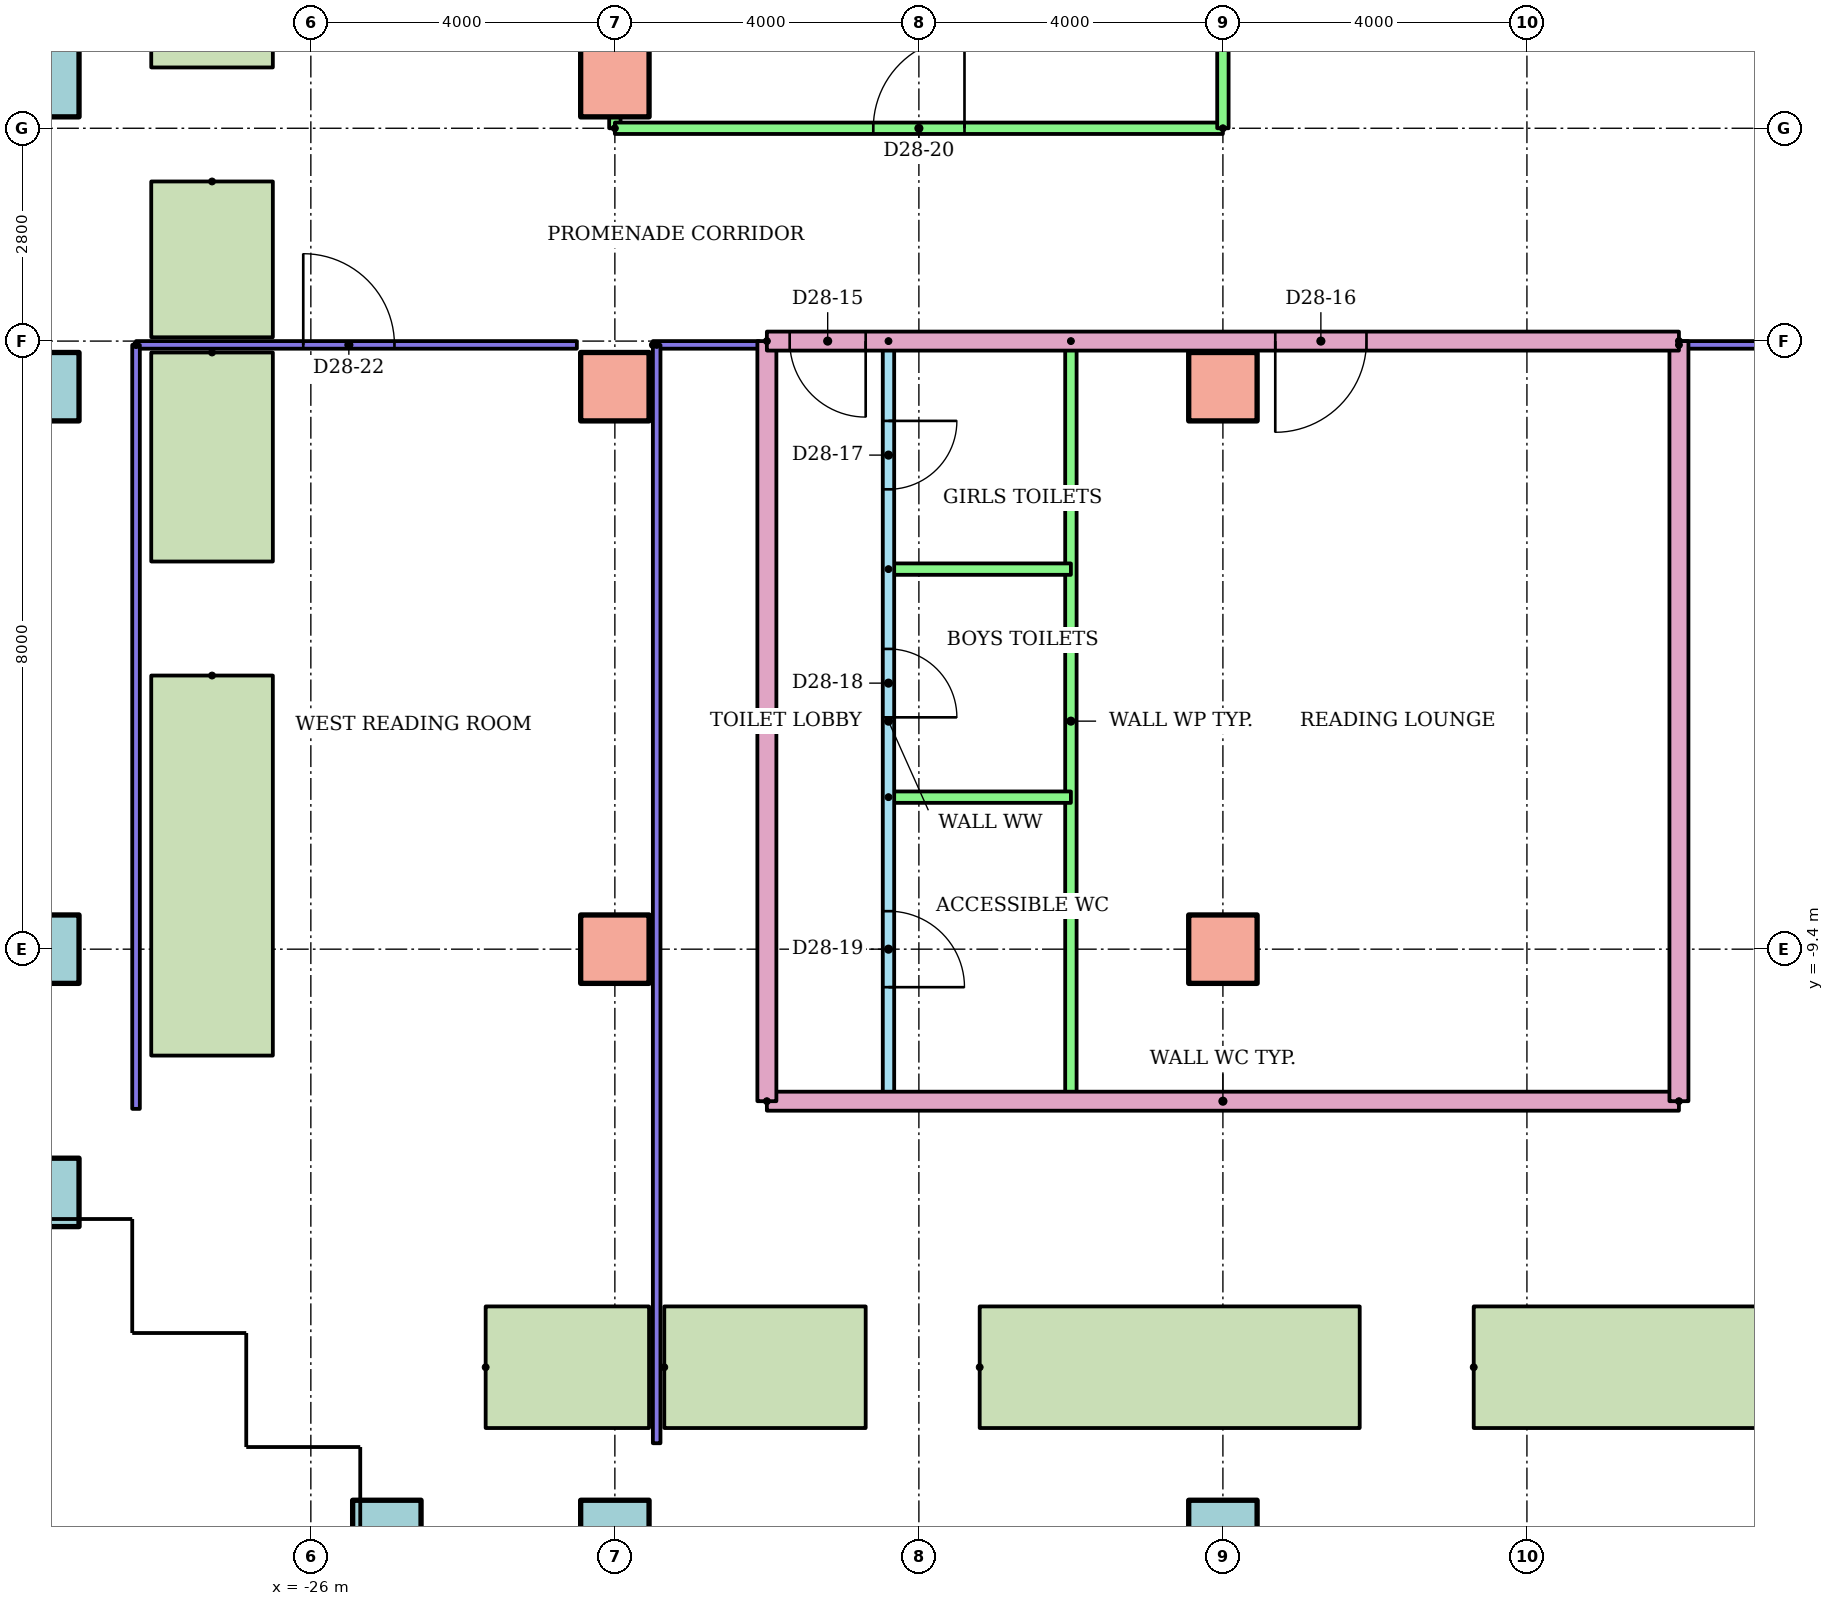
"""IFC4 building model, lengths in metres.
Left out: names, types, materials, properties, quantities, classifications, styles, units other than length and angle.
Written with IfcOpenShell. Run it as: python <this file> out.ifc"""

import sys

from ifc_helpers import new_model, si_unit, direction, frame, frame_2d, origin, origin_2d, place, context, subcontext, project, spatial, rectangle, hollow_rectangle, extrude, element, fill, save


model = new_model("IFC4")
c1 = context("Model", 3, precision=1e-05, world=origin(), true_north=direction((0.0, 1.0)))
c2 = subcontext(c1, "Body", "Model", "MODEL_VIEW")
j1 = project(units=[si_unit("LENGTHUNIT", "METRE"), si_unit("PLANEANGLEUNIT", "RADIAN")], contexts=[c1])
p1 = place(None, origin())
s1 = spatial("IfcSite", under=j1, at=p1, CompositionType="ELEMENT")
p2 = place(p1, origin())
s2 = spatial("IfcBuilding", under=s1, at=p2, CompositionType="ELEMENT")
p3 = place(p2, frame((0.0, 0.0, 106.3)))
s3 = spatial("IfcBuildingStorey", under=s2, at=p3, CompositionType="ELEMENT", Elevation=106.3)
p4 = place(p3, frame((-25.0, -17.1, 0.0)))
e1 = element("IfcColumn", 1, at=p4, inside=s3, PredefinedType="COLUMN", context=c2, shape_type="SweptSolid", body=[
    extrude(hollow_rectangle(XDim=0.9, YDim=0.9, WallThickness=0.045, at=origin_2d()), origin(), (0.0, 0.0, 1.0), 8.8),
])
for number, where in (
    (2, (-22.0, -17.1, 0.0)),
    (3, (-14.0, -17.1, 0.0)),
):
    element("IfcColumn", number, at=place(p3, frame(where)), inside=s3, PredefinedType="COLUMN", context=c2, shape_type="SweptSolid", body=[
        extrude(hollow_rectangle(XDim=0.9, YDim=0.9, WallThickness=0.045, at=origin_2d()), origin(), (0.0, 0.0, 1.0), 9.6),
    ])
for number, where in (
    (4, (-29.5, -12.6, 0.0)),
    (5, (-29.5, -9.4, 0.0)),
):
    element("IfcColumn", number, at=place(p3, frame(where)), inside=s3, PredefinedType="COLUMN", context=c2, shape_type="SweptSolid", body=[
        extrude(hollow_rectangle(XDim=0.9, YDim=0.9, WallThickness=0.045, at=origin_2d()), origin(), (0.0, 0.0, 1.0), 8.8),
    ])
for number, where in (
    (6, (-22.0, -9.4, 0.0)),
    (7, (-14.0, -9.4, 0.0)),
):
    element("IfcColumn", number, at=place(p3, frame(where)), inside=s3, PredefinedType="COLUMN", context=c2, shape_type="SweptSolid", body=[
        extrude(rectangle(XDim=0.9, YDim=0.9, at=origin_2d()), origin(), (0.0, 0.0, 1.0), 9.6),
    ])
p5 = place(p3, frame((-29.5, -2.0, 0.0)))
e8 = element("IfcColumn", 8, at=p5, inside=s3, PredefinedType="COLUMN", context=c2, shape_type="SweptSolid", body=[
    extrude(hollow_rectangle(XDim=0.9, YDim=0.9, WallThickness=0.045, at=origin_2d()), origin(), (0.0, 0.0, 1.0), 8.8),
])
for number, where in (
    (9, (-22.0, -2.0, 0.0)),
    (10, (-14.0, -2.0, 0.0)),
):
    element("IfcColumn", number, at=place(p3, frame(where)), inside=s3, PredefinedType="COLUMN", context=c2, shape_type="SweptSolid", body=[
        extrude(rectangle(XDim=0.9, YDim=0.9, at=origin_2d()), origin(), (0.0, 0.0, 1.0), 9.6),
    ])
p6 = place(p3, frame((-29.5, 2.0, 0.0)))
e11 = element("IfcColumn", 11, at=p6, inside=s3, PredefinedType="COLUMN", context=c2, shape_type="SweptSolid", body=[
    extrude(hollow_rectangle(XDim=0.9, YDim=0.9, WallThickness=0.045, at=origin_2d()), origin(), (0.0, 0.0, 1.0), 8.8),
])
p7 = place(p3, frame((-22.0, 2.0, 0.0)))
e12 = element("IfcColumn", 12, at=p7, inside=s3, PredefinedType="COLUMN", context=c2, shape_type="SweptSolid", body=[
    extrude(rectangle(XDim=0.9, YDim=0.9, at=origin_2d()), origin(), (0.0, 0.0, 1.0), 9.6),
])
for number, where, z_axis, x_axis in (
    (13, (-27.3, 7.2, 0.0), (0.0, 0.0, 1.0), (0.0, -1.0, 0.0)),
    (14, (-27.3, -5.8, 0.0), (0.0, 0.0, 1.0), (0.0, -1.0, 0.0)),
):
    element("IfcWall", number, at=place(p3, frame(where, z_axis=z_axis, x_axis=x_axis)), inside=s3, PredefinedType="STANDARD", context=c2, shape_type="SweptSolid", body=[
        extrude(rectangle(XDim=5.0, YDim=1.6, at=frame_2d((2.5, 0.0))), origin(), (0.0, 0.0, 1.0), 0.8),
    ])
for number, where in (
    (15, (-17.2, -14.9, 0.0)),
    (16, (-10.7, -14.9, 0.0)),
):
    element("IfcWall", number, at=place(p3, frame(where)), inside=s3, PredefinedType="STANDARD", context=c2, shape_type="SweptSolid", body=[
        extrude(rectangle(XDim=5.0, YDim=1.6, at=frame_2d((2.5, 0.0))), origin(), (0.0, 0.0, 1.0), 0.8),
    ])
p8 = place(p3, frame((-20.0, -11.4, 0.0)))
e17 = element("IfcWall", 17, at=p8, inside=s3, PredefinedType="PARTITIONING", context=c2, shape_type="SweptSolid", body=[
    extrude(rectangle(XDim=12.0, YDim=0.25, at=frame_2d((6.0, 0.0))), origin(), (0.0, 0.0, 1.0), 8.8),
])
for number, where, z_axis, x_axis in (
    (18, (-20.0, -1.4, 0.0), (0.0, 0.0, 1.0), (0.0, -1.0, 0.0)),
    (19, (-8.0, -11.4, 0.0), (0.0, 0.0, 1.0), (0.0, 1.0, 0.0)),
):
    element("IfcWall", number, at=place(p3, frame(where, z_axis=z_axis, x_axis=x_axis)), inside=s3, PredefinedType="PARTITIONING", context=c2, shape_type="SweptSolid", body=[
        extrude(rectangle(XDim=10.0, YDim=0.25, at=frame_2d((5.0, 0.0))), origin(), (0.0, 0.0, 1.0), 8.8),
    ])
p9 = place(p3, frame((-8.0, -1.4, 0.0), z_axis=(0.0, 0.0, 1.0), x_axis=(-1.0, 0.0, 0.0)))
e20 = element("IfcWall", 20, at=p9, inside=s3, PredefinedType="PARTITIONING", context=c2, shape_type="SweptSolid", body=[
    extrude(rectangle(XDim=12.0, YDim=0.25, at=frame_2d((6.0, 0.0))), origin(), (0.0, 0.0, 1.0), 8.8),
])
p10 = place(p9, frame((10.7, 0.0, 0.0)))
e21 = element("IfcOpeningElement", 21, at=p10, cuts=e20, PredefinedType="OPENING", context=c2, shape_type="SweptSolid", body=[
    extrude(rectangle(XDim=1.0, YDim=2.1, at=frame_2d((0.5, 1.05))), frame((0.0, 0.135, 0.0), z_axis=(0.0, -1.0, 0.0), x_axis=(1.0, 0.0, 0.0)), (0.0, 0.0, 1.0), 0.27),
])
p11 = place(p9, frame((4.111, 0.0, 0.0)))
e22 = element("IfcOpeningElement", 22, at=p11, cuts=e20, PredefinedType="OPENING", context=c2, shape_type="SweptSolid", body=[
    extrude(rectangle(XDim=1.2, YDim=2.1, at=frame_2d((0.6, 1.05))), frame((0.0, 0.135, 0.0), z_axis=(0.0, -1.0, 0.0), x_axis=(1.0, 0.0, 0.0)), (0.0, 0.0, 1.0), 0.27),
])
p12 = place(p3, frame((-18.4, -1.4, 0.0), z_axis=(0.0, 0.0, 1.0), x_axis=(0.0, -1.0, 0.0)))
e23 = element("IfcWall", 23, at=p12, inside=s3, PredefinedType="PARTITIONING", context=c2, shape_type="SweptSolid", body=[
    extrude(rectangle(XDim=10.0, YDim=0.15, at=frame_2d((5.0, 0.0))), origin(), (0.0, 0.0, 1.0), 8.8),
])
p13 = place(p12, frame((1.05, 0.0, 0.0)))
e24 = element("IfcOpeningElement", 24, at=p13, cuts=e23, PredefinedType="OPENING", context=c2, shape_type="SweptSolid", body=[
    extrude(rectangle(XDim=0.9, YDim=2.1, at=frame_2d((0.45, 1.05))), frame((0.0, 0.085, 0.0), z_axis=(0.0, -1.0, 0.0), x_axis=(1.0, 0.0, 0.0)), (0.0, 0.0, 1.0), 0.17),
])
p14 = place(p12, frame((4.05, 0.0, 0.0)))
e25 = element("IfcOpeningElement", 25, at=p14, cuts=e23, PredefinedType="OPENING", context=c2, shape_type="SweptSolid", body=[
    extrude(rectangle(XDim=0.9, YDim=2.1, at=frame_2d((0.45, 1.05))), frame((0.0, 0.085, 0.0), z_axis=(0.0, -1.0, 0.0), x_axis=(1.0, 0.0, 0.0)), (0.0, 0.0, 1.0), 0.17),
])
p15 = place(p12, frame((7.5, 0.0, 0.0)))
e26 = element("IfcOpeningElement", 26, at=p15, cuts=e23, PredefinedType="OPENING", context=c2, shape_type="SweptSolid", body=[
    extrude(rectangle(XDim=1.0, YDim=2.1, at=frame_2d((0.5, 1.05))), frame((0.0, 0.085, 0.0), z_axis=(0.0, -1.0, 0.0), x_axis=(1.0, 0.0, 0.0)), (0.0, 0.0, 1.0), 0.17),
])
p16 = place(p3, frame((-16.0, -1.4, 0.0), z_axis=(0.0, 0.0, 1.0), x_axis=(0.0, -1.0, 0.0)))
e27 = element("IfcWall", 27, at=p16, inside=s3, PredefinedType="PARTITIONING", context=c2, shape_type="SweptSolid", body=[
    extrude(rectangle(XDim=10.0, YDim=0.15, at=frame_2d((5.0, 0.0))), origin(), (0.0, 0.0, 1.0), 8.8),
])
for number, where in (
    (28, (-18.4, -4.4, 0.0)),
    (29, (-18.4, -7.4, 0.0)),
):
    element("IfcWall", number, at=place(p3, frame(where)), inside=s3, PredefinedType="PARTITIONING", context=c2, shape_type="SweptSolid", body=[
        extrude(rectangle(XDim=2.4, YDim=0.15, at=frame_2d((1.2, 0.0))), origin(), (0.0, 0.0, 1.0), 8.8),
    ])
p17 = place(p3, frame((-22.0, 10.4, 0.0), z_axis=(0.0, 0.0, 1.0), x_axis=(0.0, -1.0, 0.0)))
e30 = element("IfcWall", 30, at=p17, inside=s3, PredefinedType="PARTITIONING", context=c2, shape_type="SweptSolid", body=[
    extrude(rectangle(XDim=9.0, YDim=0.15, at=frame_2d((4.5, 0.0))), origin(), (0.0, 0.0, 1.0), 8.8),
])
p18 = place(p3, frame((-22.0, 1.4, 0.0)))
e31 = element("IfcWall", 31, at=p18, inside=s3, PredefinedType="PARTITIONING", context=c2, shape_type="SweptSolid", body=[
    extrude(rectangle(XDim=8.0, YDim=0.15, at=frame_2d((4.0, 0.0))), origin(), (0.0, 0.0, 1.0), 8.8),
])
p19 = place(p18, frame((3.4, 0.0, 0.0)))
e32 = element("IfcOpeningElement", 32, at=p19, cuts=e31, PredefinedType="OPENING", context=c2, shape_type="SweptSolid", body=[
    extrude(rectangle(XDim=1.2, YDim=2.1, at=frame_2d((0.6, 1.05))), frame((0.0, 0.085, 0.0), z_axis=(0.0, -1.0, 0.0), x_axis=(1.0, 0.0, 0.0)), (0.0, 0.0, 1.0), 0.17),
])
p20 = place(p3, frame((-14.0, 1.4, 0.0), z_axis=(0.0, 0.0, 1.0), x_axis=(0.0, 1.0, 0.0)))
e33 = element("IfcWall", 33, at=p20, inside=s3, PredefinedType="PARTITIONING", context=c2, shape_type="SweptSolid", body=[
    extrude(rectangle(XDim=1.6, YDim=0.15, at=frame_2d((0.8, 0.0))), origin(), (0.0, 0.0, 1.0), 8.8),
])
p21 = place(p3, frame((-28.3, -1.45, 0.0)))
e34 = element("IfcWall", 34, at=p21, inside=s3, PredefinedType="PARTITIONING", context=c2, shape_type="SweptSolid", body=[
    extrude(rectangle(XDim=5.8, YDim=0.1, at=frame_2d((2.9, 0.0))), origin(), (0.0, 0.0, 1.0), 8.8),
])
p22 = place(p21, frame((2.2, 0.0, 0.0)))
e35 = element("IfcOpeningElement", 35, at=p22, cuts=e34, PredefinedType="OPENING", context=c2, shape_type="SweptSolid", body=[
    extrude(rectangle(XDim=1.2, YDim=2.1, at=frame_2d((0.6, 1.05))), frame((0.0, 0.06, 0.0), z_axis=(0.0, -1.0, 0.0), x_axis=(1.0, 0.0, 0.0)), (0.0, 0.0, 1.0), 0.12),
])
p23 = place(p3, frame((-21.5, -1.45, 0.0)))
e36 = element("IfcWall", 36, at=p23, inside=s3, PredefinedType="PARTITIONING", context=c2, shape_type="SweptSolid", body=[
    extrude(rectangle(XDim=1.4, YDim=0.1, at=frame_2d((0.7, 0.0))), origin(), (0.0, 0.0, 1.0), 8.8),
])
p24 = place(p3, frame((-8.0, -1.45, 0.0)))
e37 = element("IfcWall", 37, at=p24, inside=s3, PredefinedType="PARTITIONING", context=c2, shape_type="SweptSolid", body=[
    extrude(rectangle(XDim=8.0, YDim=0.1, at=frame_2d((4.0, 0.0))), origin(), (0.0, 0.0, 1.0), 8.8),
])
p25 = place(p24, frame((4.1, 0.0, 0.0)))
e38 = element("IfcOpeningElement", 38, at=p25, cuts=e37, PredefinedType="OPENING", context=c2, shape_type="SweptSolid", body=[
    extrude(rectangle(XDim=1.8, YDim=2.1, at=frame_2d((0.9, 1.05))), frame((0.0, 0.06, 0.0), z_axis=(0.0, -1.0, 0.0), x_axis=(1.0, 0.0, 0.0)), (0.0, 0.0, 1.0), 0.12),
])
p26 = place(p3, frame((-21.45, -1.45, 0.0), z_axis=(0.0, 0.0, 1.0), x_axis=(0.0, -1.0, 0.0)))
e39 = element("IfcWall", 39, at=p26, inside=s3, PredefinedType="PARTITIONING", context=c2, shape_type="SweptSolid", body=[
    extrude(rectangle(XDim=14.45, YDim=0.1, at=frame_2d((7.225, 0.0))), origin(), (0.0, 0.0, 1.0), 8.8),
])
p27 = place(p3, frame((-28.3, -1.45, 0.0), z_axis=(0.0, 0.0, 1.0), x_axis=(0.0, -1.0, 0.0)))
e40 = element("IfcWall", 40, at=p27, inside=s3, PredefinedType="PARTITIONING", context=c2, shape_type="SweptSolid", body=[
    extrude(rectangle(XDim=10.051, YDim=0.1, at=frame_2d((5.025, 0.0))), origin(), (0.0, 0.0, 1.0), 8.8),
])
p28 = place(p3, frame((-27.3, 0.7, 0.0), z_axis=(0.0, 0.0, 1.0), x_axis=(0.0, -1.0, 0.0)))
e41 = element("IfcWall", 41, at=p28, inside=s3, PredefinedType="STANDARD", context=c2, shape_type="SweptSolid", body=[
    extrude(rectangle(XDim=2.05, YDim=1.6, at=frame_2d((1.025, 0.0))), origin(), (0.0, 0.0, 1.0), 0.8),
])
p29 = place(p3, frame((-27.3, -1.55, 0.0), z_axis=(0.0, 0.0, 1.0), x_axis=(0.0, -1.0, 0.0)))
e42 = element("IfcWall", 42, at=p29, inside=s3, PredefinedType="STANDARD", context=c2, shape_type="SweptSolid", body=[
    extrude(rectangle(XDim=2.75, YDim=1.6, at=frame_2d((1.375, 0.0))), origin(), (0.0, 0.0, 1.0), 0.8),
])
p30 = place(p3, frame((-23.7, -14.9, 0.0)))
e43 = element("IfcWall", 43, at=p30, inside=s3, PredefinedType="STANDARD", context=c2, shape_type="SweptSolid", body=[
    extrude(rectangle(XDim=2.15, YDim=1.6, at=frame_2d((1.075, 0.0))), origin(), (0.0, 0.0, 1.0), 0.8),
])
p31 = place(p3, frame((-21.35, -14.9, 0.0)))
e44 = element("IfcWall", 44, at=p31, inside=s3, PredefinedType="STANDARD", context=c2, shape_type="SweptSolid", body=[
    extrude(rectangle(XDim=2.65, YDim=1.6, at=frame_2d((1.325, 0.0))), origin(), (0.0, 0.0, 1.0), 0.8),
])
p32 = place(p10, origin())
e45 = element("IfcDoor", 45, at=p32, inside=s3, OperationType="SINGLE_SWING_LEFT", PredefinedType="DOOR", context=c2, shape_type="SweptSolid", body=[
    extrude(rectangle(XDim=1.0, YDim=2.1, at=frame_2d((0.5, 1.05))), frame((0.0, 0.025, 0.0), z_axis=(0.0, -1.0, 0.0), x_axis=(1.0, 0.0, 0.0)), (0.0, 0.0, 1.0), 0.05),
])
fill(e21, e45)
p33 = place(p11, origin())
e46 = element("IfcDoor", 46, at=p33, inside=s3, OperationType="SINGLE_SWING_RIGHT", PredefinedType="DOOR", context=c2, shape_type="SweptSolid", body=[
    extrude(rectangle(XDim=1.2, YDim=2.1, at=frame_2d((0.6, 1.05))), frame((0.0, 0.025, 0.0), z_axis=(0.0, -1.0, 0.0), x_axis=(1.0, 0.0, 0.0)), (0.0, 0.0, 1.0), 0.05),
])
fill(e22, e46)
p34 = place(p13, origin())
e47 = element("IfcDoor", 47, at=p34, inside=s3, OperationType="SINGLE_SWING_LEFT", PredefinedType="DOOR", context=c2, shape_type="SweptSolid", body=[
    extrude(rectangle(XDim=0.9, YDim=2.1, at=frame_2d((0.45, 1.05))), frame((0.0, 0.025, 0.0), z_axis=(0.0, -1.0, 0.0), x_axis=(1.0, 0.0, 0.0)), (0.0, 0.0, 1.0), 0.05),
])
fill(e24, e47)
p35 = place(p14, origin())
e48 = element("IfcDoor", 48, at=p35, inside=s3, OperationType="SINGLE_SWING_RIGHT", PredefinedType="DOOR", context=c2, shape_type="SweptSolid", body=[
    extrude(rectangle(XDim=0.9, YDim=2.1, at=frame_2d((0.45, 1.05))), frame((0.0, 0.025, 0.0), z_axis=(0.0, -1.0, 0.0), x_axis=(1.0, 0.0, 0.0)), (0.0, 0.0, 1.0), 0.05),
])
fill(e25, e48)
p36 = place(p15, origin())
e49 = element("IfcDoor", 49, at=p36, inside=s3, OperationType="SINGLE_SWING_RIGHT", PredefinedType="DOOR", context=c2, shape_type="SweptSolid", body=[
    extrude(rectangle(XDim=1.0, YDim=2.1, at=frame_2d((0.5, 1.05))), frame((0.0, 0.025, 0.0), z_axis=(0.0, -1.0, 0.0), x_axis=(1.0, 0.0, 0.0)), (0.0, 0.0, 1.0), 0.05),
])
fill(e26, e49)
p37 = place(p19, origin())
e50 = element("IfcDoor", 50, at=p37, inside=s3, OperationType="SINGLE_SWING_RIGHT", PredefinedType="DOOR", context=c2, shape_type="SweptSolid", body=[
    extrude(rectangle(XDim=1.2, YDim=2.1, at=frame_2d((0.6, 1.05))), frame((0.0, 0.025, 0.0), z_axis=(0.0, -1.0, 0.0), x_axis=(1.0, 0.0, 0.0)), (0.0, 0.0, 1.0), 0.05),
])
fill(e32, e50)
p38 = place(p22, origin())
e51 = element("IfcDoor", 51, at=p38, inside=s3, OperationType="SINGLE_SWING_LEFT", PredefinedType="DOOR", context=c2, shape_type="SweptSolid", body=[
    extrude(rectangle(XDim=1.2, YDim=2.1, at=frame_2d((0.6, 1.05))), frame((0.0, 0.025, 0.0), z_axis=(0.0, -1.0, 0.0), x_axis=(1.0, 0.0, 0.0)), (0.0, 0.0, 1.0), 0.05),
])
fill(e35, e51)
save(model, sys.argv[1])
